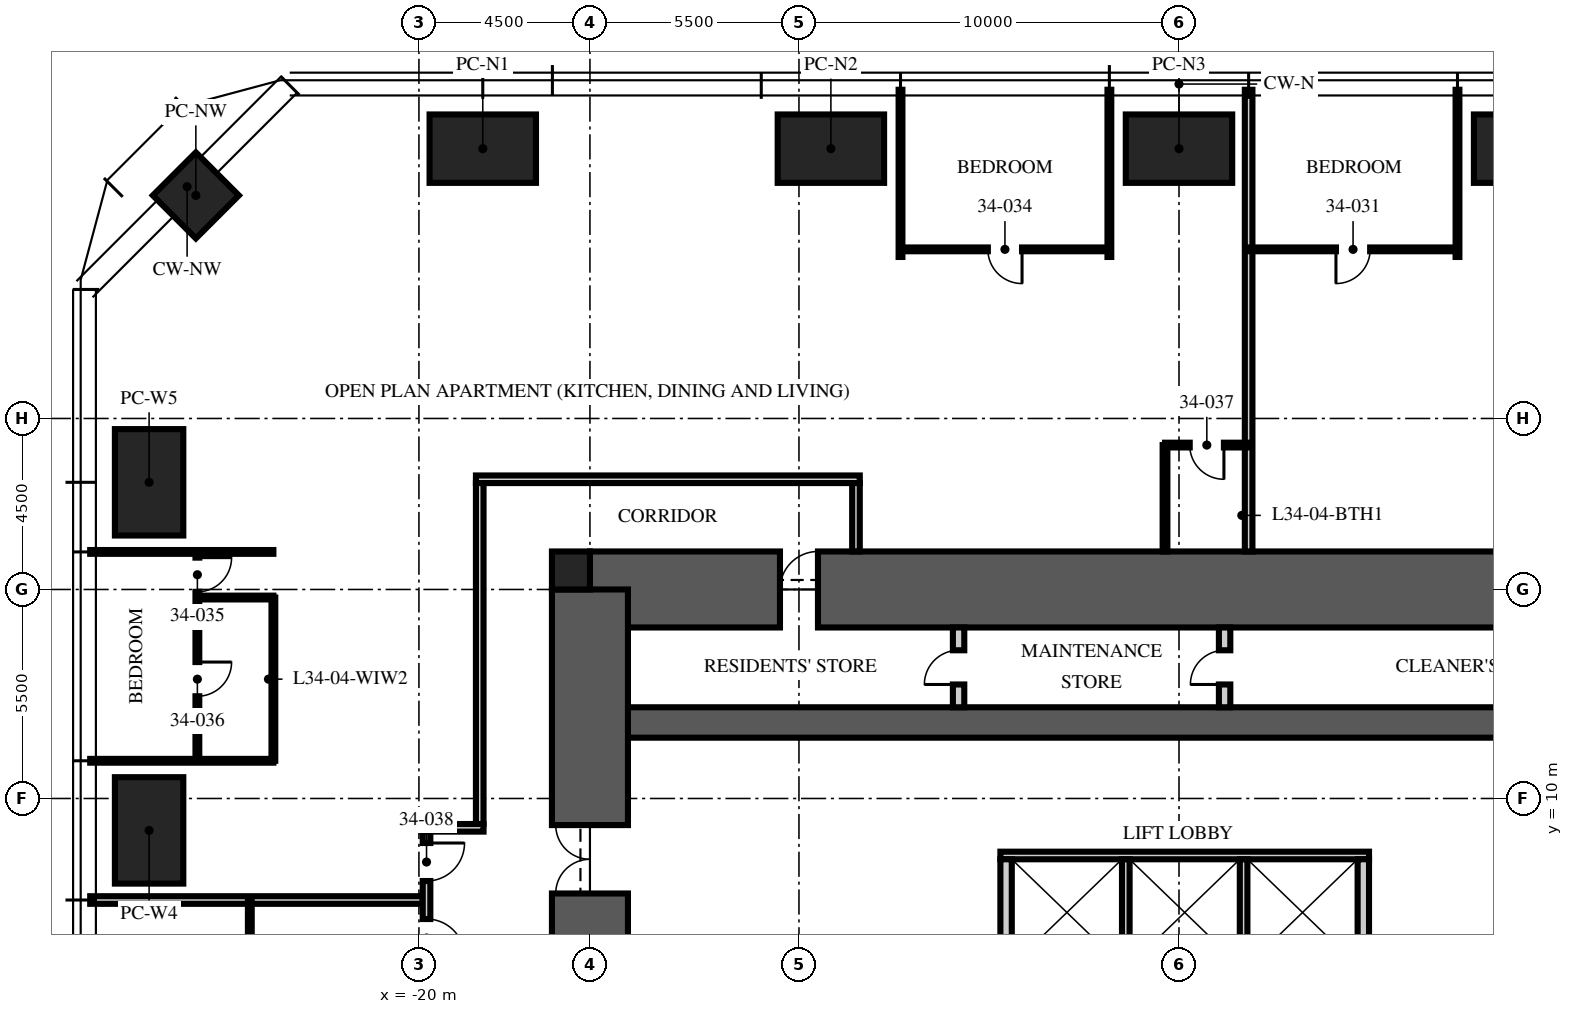
"""IFC4 building model, lengths in metres.
Left out: names, types, materials, properties, quantities, classifications, styles, units other than length and angle.
Written with IfcOpenShell. Run it as: python <this file> out.ifc"""

import sys

from ifc_helpers import new_model, si_unit, direction, frame, frame_2d, origin, origin_2d, place, context, subcontext, project, spatial, rectangle, extrude, element, fill, save


model = new_model("IFC4")
c1 = context("Model", 3, precision=1e-05, world=origin(), true_north=direction((0.0, 1.0)))
c2 = subcontext(c1, "Body", "Model", "MODEL_VIEW")
j1 = project(units=[si_unit("LENGTHUNIT", "METRE"), si_unit("PLANEANGLEUNIT", "RADIAN")], contexts=[c1])
p1 = place(None, origin())
s1 = spatial("IfcSite", under=j1, at=p1, CompositionType="ELEMENT")
p2 = place(p1, origin())
s2 = spatial("IfcBuilding", under=s1, at=p2, CompositionType="ELEMENT")
p3 = place(p2, frame((0.0, 0.0, 137.25)))
s3 = spatial("IfcBuildingStorey", under=s2, at=p3, CompositionType="ELEMENT", Elevation=137.25)
p4 = place(p3, frame((-15.5, 15.5, -0.25), z_axis=(0.0, 0.0, 1.0), x_axis=(1.0, 0.0, 0.0)))
e1 = element("IfcWall", 1, at=p4, inside=s3, PredefinedType="SHEAR", context=c2, shape_type="SweptSolid", body=[
    extrude(rectangle(XDim=31.0, YDim=2.0, at=frame_2d((15.5, 0.0))), origin(), (0.0, 0.0, 1.0), 3.75),
])
p5 = place(p4, frame((5.0, 0.0, 0.25)))
e2 = element("IfcOpeningElement", 2, at=p5, cuts=e1, PredefinedType="OPENING", context=c2, shape_type="SweptSolid", body=[
    extrude(rectangle(XDim=1.0, YDim=2.1, at=frame_2d((0.5, 1.05))), frame((0.0, 1.01, 0.0), z_axis=(0.0, -1.0, 0.0), x_axis=(1.0, 0.0, 0.0)), (0.0, 0.0, 1.0), 2.02),
])
p6 = place(p3, frame((-15.5, 12.0, -0.25), z_axis=(0.0, 0.0, 1.0), x_axis=(1.0, 0.0, 0.0)))
e3 = element("IfcWall", 3, at=p6, inside=s3, PredefinedType="SHEAR", context=c2, shape_type="SweptSolid", body=[
    extrude(rectangle(XDim=31.0, YDim=0.8, at=frame_2d((15.5, 0.0))), origin(), (0.0, 0.0, 1.0), 3.75),
])
p7 = place(p3, frame((-15.5, -15.5, -0.25), z_axis=(0.0, 0.0, 1.0), x_axis=(0.0, 1.0, 0.0)))
e4 = element("IfcWall", 4, at=p7, inside=s3, PredefinedType="SHEAR", context=c2, shape_type="SweptSolid", body=[
    extrude(rectangle(XDim=31.0, YDim=2.0, at=frame_2d((15.5, 0.0))), origin(), (0.0, 0.0, 1.0), 3.75),
])
p8 = place(p7, frame((6.5, 0.0, 0.25)))
e5 = element("IfcOpeningElement", 5, at=p8, cuts=e4, PredefinedType="OPENING", context=c2, shape_type="SweptSolid", body=[
    extrude(rectangle(XDim=1.2, YDim=2.1, at=frame_2d((0.6, 1.05))), frame((0.0, 1.01, 0.0), z_axis=(0.0, -1.0, 0.0), x_axis=(1.0, 0.0, 0.0)), (0.0, 0.0, 1.0), 2.02),
])
p9 = place(p7, frame((23.0, 0.0, 0.25)))
e6 = element("IfcOpeningElement", 6, at=p9, cuts=e4, PredefinedType="OPENING", context=c2, shape_type="SweptSolid", body=[
    extrude(rectangle(XDim=1.8, YDim=2.1, at=frame_2d((0.9, 1.05))), frame((0.0, 1.01, 0.0), z_axis=(0.0, -1.0, 0.0), x_axis=(1.0, 0.0, 0.0)), (0.0, 0.0, 1.0), 2.02),
])
p10 = place(p3, frame((-16.0, 16.0, -0.25), z_axis=(0.0, 0.0, 1.0), x_axis=(1.0, 0.0, 0.0)))
e7 = element("IfcColumn", 7, at=p10, inside=s3, PredefinedType="COLUMN", context=c2, shape_type="SweptSolid", body=[
    extrude(rectangle(XDim=1.0, YDim=1.0, at=origin_2d()), origin(), (0.0, 0.0, 1.0), 3.75),
])
for number, where, z_axis, x_axis in (
    (8, (-18.32, 27.1, 0.0), (0.0, 0.0, 1.0), (1.0, 0.0, 0.0)),
    (9, (-9.16, 27.1, 0.0), (0.0, 0.0, 1.0), (1.0, 0.0, 0.0)),
    (10, (0.0, 27.1, 0.0), (0.0, 0.0, 1.0), (1.0, 0.0, 0.0)),
    (11, (9.16, 27.1, 0.0), (0.0, 0.0, 1.0), (1.0, 0.0, 0.0)),
    (12, (-27.1, 9.16, 0.0), (0.0, 0.0, 1.0), (0.0, 1.0, 0.0)),
    (13, (-27.1, 18.32, 0.0), (0.0, 0.0, 1.0), (0.0, 1.0, 0.0)),
):
    element("IfcColumn", number, at=place(p3, frame(where, z_axis=z_axis, x_axis=x_axis)), inside=s3, PredefinedType="COLUMN", context=c2, shape_type="SweptSolid", body=[
        extrude(rectangle(XDim=2.8, YDim=1.8, at=origin_2d()), origin(), (0.0, 0.0, 1.0), 3.75),
    ])
p11 = place(p3, frame((-25.87, 25.87, 0.0), z_axis=(0.0, 0.0, 1.0), x_axis=(0.707106781187, 0.707106781187, 0.0)))
e14 = element("IfcColumn", 14, at=p11, inside=s3, PredefinedType="COLUMN", context=c2, shape_type="SweptSolid", body=[
    extrude(rectangle(XDim=1.6, YDim=1.6, at=origin_2d()), origin(), (0.0, 0.0, 1.0), 3.75),
])
p12 = place(p3, frame((-4.7, 8.5, 0.0), z_axis=(0.0, 0.0, 1.0), x_axis=(1.0, 0.0, 0.0)))
e15 = element("IfcWall", 15, at=p12, inside=s3, PredefinedType="PARTITIONING", context=c2, shape_type="SweptSolid", body=[
    extrude(rectangle(XDim=9.7, YDim=0.2, at=frame_2d((4.85, 0.0))), origin(), (0.0, 0.0, 1.0), 3.5),
])
for number, where, z_axis, x_axis in (
    (16, (-4.55, 5.6, 0.0), (0.0, 0.0, 1.0), (0.0, 1.0, 0.0)),
    (17, (4.85, 5.6, 0.0), (0.0, 0.0, 1.0), (0.0, 1.0, 0.0)),
):
    element("IfcWall", number, at=place(p3, frame(where, z_axis=z_axis, x_axis=x_axis)), inside=s3, PredefinedType="PARTITIONING", context=c2, shape_type="SweptSolid", body=[
        extrude(rectangle(XDim=2.8, YDim=0.3, at=frame_2d((1.4, 0.0))), origin(), (0.0, 0.0, 1.0), 3.5),
    ])
for number, where, z_axis, x_axis in (
    (18, (-1.4, 5.6, 0.0), (0.0, 0.0, 1.0), (0.0, 1.0, 0.0)),
    (19, (1.7, 5.6, 0.0), (0.0, 0.0, 1.0), (0.0, 1.0, 0.0)),
):
    element("IfcWall", number, at=place(p3, frame(where, z_axis=z_axis, x_axis=x_axis)), inside=s3, PredefinedType="PARTITIONING", context=c2, shape_type="SweptSolid", body=[
        extrude(rectangle(XDim=2.8, YDim=0.2, at=frame_2d((1.4, 0.0))), origin(), (0.0, 0.0, 1.0), 3.5),
    ])
p13 = place(p3, frame((-5.8, 12.4, 0.0), z_axis=(0.0, 0.0, 1.0), x_axis=(0.0, 1.0, 0.0)))
e20 = element("IfcWall", 20, at=p13, inside=s3, PredefinedType="PARTITIONING", context=c2, shape_type="SweptSolid", body=[
    extrude(rectangle(XDim=2.1, YDim=0.3, at=frame_2d((1.05, 0.0))), origin(), (0.0, 0.0, 1.0), 3.5),
])
p14 = place(p13, frame((0.6, 0.0, 0.0)))
e21 = element("IfcOpeningElement", 21, at=p14, cuts=e20, PredefinedType="OPENING", context=c2, shape_type="SweptSolid", body=[
    extrude(rectangle(XDim=0.9, YDim=2.1, at=frame_2d((0.45, 1.05))), frame((0.0, 0.16, 0.0), z_axis=(0.0, -1.0, 0.0), x_axis=(1.0, 0.0, 0.0)), (0.0, 0.0, 1.0), 0.32),
])
p15 = place(p3, frame((1.2, 12.4, 0.0), z_axis=(0.0, 0.0, 1.0), x_axis=(0.0, 1.0, 0.0)))
e22 = element("IfcWall", 22, at=p15, inside=s3, PredefinedType="PARTITIONING", context=c2, shape_type="SweptSolid", body=[
    extrude(rectangle(XDim=2.1, YDim=0.3, at=frame_2d((1.05, 0.0))), origin(), (0.0, 0.0, 1.0), 3.5),
])
p16 = place(p15, frame((0.6, 0.0, 0.0)))
e23 = element("IfcOpeningElement", 23, at=p16, cuts=e22, PredefinedType="OPENING", context=c2, shape_type="SweptSolid", body=[
    extrude(rectangle(XDim=0.9, YDim=2.1, at=frame_2d((0.45, 1.05))), frame((0.0, 0.16, 0.0), z_axis=(0.0, -1.0, 0.0), x_axis=(1.0, 0.0, 0.0)), (0.0, 0.0, 1.0), 0.32),
])
p17 = place(p3, frame((-18.5, 18.4, 0.0), z_axis=(0.0, 0.0, 1.0), x_axis=(1.0, 0.0, 0.0)))
e24 = element("IfcWall", 24, at=p17, inside=s3, PredefinedType="PARTITIONING", context=c2, shape_type="SweptSolid", body=[
    extrude(rectangle(XDim=10.1, YDim=0.2, at=frame_2d((5.05, 0.0))), origin(), (0.0, 0.0, 1.0), 2.3),
])
p18 = place(p3, frame((-8.5, 18.3, 0.0), z_axis=(0.0, 0.0, 1.0), x_axis=(0.0, -1.0, 0.0)))
e25 = element("IfcWall", 25, at=p18, inside=s3, PredefinedType="PARTITIONING", context=c2, shape_type="SweptSolid", body=[
    extrude(rectangle(XDim=1.8, YDim=0.2, at=frame_2d((0.9, 0.0))), origin(), (0.0, 0.0, 1.0), 3.5),
])
p19 = place(p3, frame((7.328, 24.25, 0.0), z_axis=(0.0, 0.0, 1.0), x_axis=(0.0, 1.0, 0.0)))
e26 = element("IfcWall", 26, at=p19, inside=s3, PredefinedType="PARTITIONING", context=c2, shape_type="SweptSolid", body=[
    extrude(rectangle(XDim=4.4, YDim=0.1, at=frame_2d((2.2, 0.0))), origin(), (0.0, 0.0, 1.0), 2.81),
])
p20 = place(p3, frame((1.832, 16.5, 0.0), z_axis=(0.0, 0.0, 1.0), x_axis=(0.0, 1.0, 0.0)))
e27 = element("IfcWall", 27, at=p20, inside=s3, PredefinedType="PARTITIONING", context=c2, shape_type="SweptSolid", body=[
    extrude(rectangle(XDim=12.15, YDim=0.2, at=frame_2d((6.075, 0.0))), origin(), (0.0, 0.0, 1.0), 2.81),
])
for number, where, z_axis, x_axis in (
    (28, (-1.832, 24.25, 0.0), (0.0, 0.0, 1.0), (0.0, 1.0, 0.0)),
    (29, (-7.328, 24.25, 0.0), (0.0, 0.0, 1.0), (0.0, 1.0, 0.0)),
):
    element("IfcWall", number, at=place(p3, frame(where, z_axis=z_axis, x_axis=x_axis)), inside=s3, PredefinedType="PARTITIONING", context=c2, shape_type="SweptSolid", body=[
        extrude(rectangle(XDim=4.4, YDim=0.1, at=frame_2d((2.2, 0.0))), origin(), (0.0, 0.0, 1.0), 2.81),
    ])
for number, where, z_axis, x_axis in (
    (30, (-23.83, 16.488, 0.0), (0.0, 0.0, 1.0), (-1.0, 0.0, 0.0)),
    (31, (-23.83, 10.992, 0.0), (0.0, 0.0, 1.0), (-1.0, 0.0, 0.0)),
):
    element("IfcWall", number, at=place(p3, frame(where, z_axis=z_axis, x_axis=x_axis)), inside=s3, PredefinedType="PARTITIONING", context=c2, shape_type="SweptSolid", body=[
        extrude(rectangle(XDim=4.82, YDim=0.1, at=frame_2d((2.41, 0.0))), origin(), (0.0, 0.0, 1.0), 2.81),
    ])
p21 = place(p3, frame((-19.9, 7.328, 0.0), z_axis=(0.0, 0.0, 1.0), x_axis=(-1.0, 0.0, 0.0)))
e32 = element("IfcWall", 32, at=p21, inside=s3, PredefinedType="PARTITIONING", context=c2, shape_type="SweptSolid", body=[
    extrude(rectangle(XDim=8.75, YDim=0.2, at=frame_2d((4.375, 0.0))), origin(), (0.0, 0.0, 1.0), 2.81),
])
p22 = place(p3, frame((7.328, 24.45, 0.0), z_axis=(0.0, 0.0, 1.0), x_axis=(-1.0, 0.0, 0.0)))
e33 = element("IfcWall", 33, at=p22, inside=s3, PredefinedType="PARTITIONING", context=c2, shape_type="SweptSolid", body=[
    extrude(rectangle(XDim=5.496, YDim=0.1, at=frame_2d((2.748, 0.0))), origin(), (0.0, 0.0, 1.0), 2.81),
])
p23 = place(p22, frame((2.298, 0.0, 0.0)))
e34 = element("IfcOpeningElement", 34, at=p23, cuts=e33, PredefinedType="OPENING", context=c2, shape_type="SweptSolid", body=[
    extrude(rectangle(XDim=0.9, YDim=2.1, at=frame_2d((0.45, 1.05))), frame((0.0, 0.06, 0.0), z_axis=(0.0, -1.0, 0.0), x_axis=(1.0, 0.0, 0.0)), (0.0, 0.0, 1.0), 0.12),
])
p24 = place(p3, frame((-1.832, 24.45, 0.0), z_axis=(0.0, 0.0, 1.0), x_axis=(-1.0, 0.0, 0.0)))
e35 = element("IfcWall", 35, at=p24, inside=s3, PredefinedType="PARTITIONING", context=c2, shape_type="SweptSolid", body=[
    extrude(rectangle(XDim=5.496, YDim=0.1, at=frame_2d((2.748, 0.0))), origin(), (0.0, 0.0, 1.0), 2.81),
])
p25 = place(p24, frame((2.298, 0.0, 0.0)))
e36 = element("IfcOpeningElement", 36, at=p25, cuts=e35, PredefinedType="OPENING", context=c2, shape_type="SweptSolid", body=[
    extrude(rectangle(XDim=0.9, YDim=2.1, at=frame_2d((0.45, 1.05))), frame((0.0, 0.06, 0.0), z_axis=(0.0, -1.0, 0.0), x_axis=(1.0, 0.0, 0.0)), (0.0, 0.0, 1.0), 0.12),
])
p26 = place(p3, frame((-25.83, 16.488, 0.0), z_axis=(0.0, 0.0, 1.0), x_axis=(0.0, -1.0, 0.0)))
e37 = element("IfcWall", 37, at=p26, inside=s3, PredefinedType="PARTITIONING", context=c2, shape_type="SweptSolid", body=[
    extrude(rectangle(XDim=5.496, YDim=0.1, at=frame_2d((2.748, 0.0))), origin(), (0.0, 0.0, 1.0), 2.81),
])
p27 = place(p26, frame((0.15, 0.0, 0.0)))
e38 = element("IfcOpeningElement", 38, at=p27, cuts=e37, PredefinedType="OPENING", context=c2, shape_type="SweptSolid", body=[
    extrude(rectangle(XDim=0.9, YDim=2.1, at=frame_2d((0.45, 1.05))), frame((0.0, 0.06, 0.0), z_axis=(0.0, -1.0, 0.0), x_axis=(1.0, 0.0, 0.0)), (0.0, 0.0, 1.0), 0.12),
])
p28 = place(p26, frame((2.898, 0.0, 0.0)))
e39 = element("IfcOpeningElement", 39, at=p28, cuts=e37, PredefinedType="OPENING", context=c2, shape_type="SweptSolid", body=[
    extrude(rectangle(XDim=0.9, YDim=2.1, at=frame_2d((0.45, 1.05))), frame((0.0, 0.06, 0.0), z_axis=(0.0, -1.0, 0.0), x_axis=(1.0, 0.0, 0.0)), (0.0, 0.0, 1.0), 0.12),
])
p29 = place(p3, frame((-23.83, 15.288, 0.0), z_axis=(0.0, 0.0, 1.0), x_axis=(-1.0, 0.0, 0.0)))
e40 = element("IfcWall", 40, at=p29, inside=s3, PredefinedType="PARTITIONING", context=c2, shape_type="SweptSolid", body=[
    extrude(rectangle(XDim=2.0, YDim=0.1, at=frame_2d((1.0, 0.0))), origin(), (0.0, 0.0, 1.0), 3.5),
])
p30 = place(p3, frame((-23.83, 15.288, 0.0), z_axis=(0.0, 0.0, 1.0), x_axis=(0.0, -1.0, 0.0)))
e41 = element("IfcWall", 41, at=p30, inside=s3, PredefinedType="PARTITIONING", context=c2, shape_type="SweptSolid", body=[
    extrude(rectangle(XDim=4.296, YDim=0.1, at=frame_2d((2.148, 0.0))), origin(), (0.0, 0.0, 1.0), 2.81),
])
p31 = place(p3, frame((1.832, 19.3, 0.0), z_axis=(0.0, 0.0, 1.0), x_axis=(-1.0, 0.0, 0.0)))
e42 = element("IfcWall", 42, at=p31, inside=s3, PredefinedType="PARTITIONING", context=c2, shape_type="SweptSolid", body=[
    extrude(rectangle(XDim=2.2, YDim=0.125, at=frame_2d((1.1, 0.0))), origin(), (0.0, 0.0, 1.0), 2.7),
])
p32 = place(p31, frame((0.65, 0.0, 0.0)))
e43 = element("IfcOpeningElement", 43, at=p32, cuts=e42, PredefinedType="OPENING", context=c2, shape_type="SweptSolid", body=[
    extrude(rectangle(XDim=0.9, YDim=2.1, at=frame_2d((0.45, 1.05))), frame((0.0, 0.073, 0.0), z_axis=(0.0, -1.0, 0.0), x_axis=(1.0, 0.0, 0.0)), (0.0, 0.0, 1.0), 0.145),
])
p33 = place(p3, frame((-0.368, 16.5, 0.0), z_axis=(0.0, 0.0, 1.0), x_axis=(0.0, 1.0, 0.0)))
e44 = element("IfcWall", 44, at=p33, inside=s3, PredefinedType="PARTITIONING", context=c2, shape_type="SweptSolid", body=[
    extrude(rectangle(XDim=2.8, YDim=0.125, at=frame_2d((1.4, 0.0))), origin(), (0.0, 0.0, 1.0), 3.5),
])
p34 = place(p3, frame((-24.45, 7.328, 0.0), z_axis=(0.0, 0.0, 1.0), x_axis=(0.0, -1.0, 0.0)))
e45 = element("IfcWall", 45, at=p34, inside=s3, PredefinedType="PARTITIONING", context=c2, shape_type="SweptSolid", body=[
    extrude(rectangle(XDim=5.496, YDim=0.1, at=frame_2d((2.748, 0.0))), origin(), (0.0, 0.0, 1.0), 2.81),
])
p35 = place(p34, frame((2.298, 0.0, 0.0)))
e46 = element("IfcOpeningElement", 46, at=p35, cuts=e45, PredefinedType="OPENING", context=c2, shape_type="SweptSolid", body=[
    extrude(rectangle(XDim=0.9, YDim=2.1, at=frame_2d((0.45, 1.05))), frame((0.0, 0.06, 0.0), z_axis=(0.0, -1.0, 0.0), x_axis=(1.0, 0.0, 0.0)), (0.0, 0.0, 1.0), 0.12),
])
p36 = place(p3, frame((-18.4, 18.3, 0.0), z_axis=(0.0, 0.0, 1.0), x_axis=(0.0, -1.0, 0.0)))
e47 = element("IfcWall", 47, at=p36, inside=s3, PredefinedType="PARTITIONING", context=c2, shape_type="SweptSolid", body=[
    extrude(rectangle(XDim=8.972, YDim=0.2, at=frame_2d((4.486, 0.0))), origin(), (0.0, 0.0, 1.0), 2.3),
])
p37 = place(p3, frame((-18.3, 9.228, 0.0), z_axis=(0.0, 0.0, 1.0), x_axis=(-1.0, 0.0, 0.0)))
e48 = element("IfcWall", 48, at=p37, inside=s3, PredefinedType="PARTITIONING", context=c2, shape_type="SweptSolid", body=[
    extrude(rectangle(XDim=1.6, YDim=0.2, at=frame_2d((0.8, 0.0))), origin(), (0.0, 0.0, 1.0), 2.7),
])
p38 = place(p3, frame((-19.8, 9.128, 0.0), z_axis=(0.0, 0.0, 1.0), x_axis=(0.0, -1.0, 0.0)))
e49 = element("IfcWall", 49, at=p38, inside=s3, PredefinedType="PARTITIONING", context=c2, shape_type="SweptSolid", body=[
    extrude(rectangle(XDim=3.6, YDim=0.2, at=frame_2d((1.8, 0.0))), origin(), (0.0, 0.0, 1.0), 2.7),
])
p39 = place(p38, frame((0.3, 0.0, 0.0)))
e50 = element("IfcOpeningElement", 50, at=p39, cuts=e49, PredefinedType="OPENING", context=c2, shape_type="SweptSolid", body=[
    extrude(rectangle(XDim=1.0, YDim=2.2, at=frame_2d((0.5, 1.1))), frame((0.0, 0.11, 0.0), z_axis=(0.0, -1.0, 0.0), x_axis=(1.0, 0.0, 0.0)), (0.0, 0.0, 1.0), 0.22),
])
p40 = place(p38, frame((2.3, 0.0, 0.0)))
e51 = element("IfcOpeningElement", 51, at=p40, cuts=e49, PredefinedType="OPENING", context=c2, shape_type="SweptSolid", body=[
    extrude(rectangle(XDim=1.0, YDim=2.2, at=frame_2d((0.5, 1.1))), frame((0.0, 0.11, 0.0), z_axis=(0.0, -1.0, 0.0), x_axis=(1.0, 0.0, 0.0)), (0.0, 0.0, 1.0), 0.22),
])
p41 = place(p9, origin())
e52 = element("IfcDoor", 52, at=p41, inside=s3, OperationType="DOUBLE_DOOR_SINGLE_SWING", PredefinedType="DOOR", context=c2, shape_type="SweptSolid", body=[
    extrude(rectangle(XDim=1.8, YDim=2.1, at=frame_2d((0.9, 1.05))), frame((0.0, 0.025, 0.0), z_axis=(0.0, -1.0, 0.0), x_axis=(1.0, 0.0, 0.0)), (0.0, 0.0, 1.0), 0.05),
])
fill(e6, e52)
p42 = place(p14, origin())
e53 = element("IfcDoor", 53, at=p42, inside=s3, OperationType="SINGLE_SWING_LEFT", PredefinedType="DOOR", context=c2, shape_type="SweptSolid", body=[
    extrude(rectangle(XDim=0.9, YDim=2.1, at=frame_2d((0.45, 1.05))), frame((0.0, 0.025, 0.0), z_axis=(0.0, -1.0, 0.0), x_axis=(1.0, 0.0, 0.0)), (0.0, 0.0, 1.0), 0.05),
])
fill(e21, e53)
p43 = place(p16, origin())
e54 = element("IfcDoor", 54, at=p43, inside=s3, OperationType="SINGLE_SWING_LEFT", PredefinedType="DOOR", context=c2, shape_type="SweptSolid", body=[
    extrude(rectangle(XDim=0.9, YDim=2.1, at=frame_2d((0.45, 1.05))), frame((0.0, 0.025, 0.0), z_axis=(0.0, -1.0, 0.0), x_axis=(1.0, 0.0, 0.0)), (0.0, 0.0, 1.0), 0.05),
])
fill(e23, e54)
p44 = place(p5, origin())
e55 = element("IfcDoor", 55, at=p44, inside=s3, OperationType="SINGLE_SWING_RIGHT", PredefinedType="DOOR", context=c2, shape_type="SweptSolid", body=[
    extrude(rectangle(XDim=1.0, YDim=2.1, at=frame_2d((0.5, 1.05))), frame((0.0, 0.025, 0.0), z_axis=(0.0, -1.0, 0.0), x_axis=(1.0, 0.0, 0.0)), (0.0, 0.0, 1.0), 0.05),
])
fill(e2, e55)
p45 = place(p23, origin())
e56 = element("IfcDoor", 56, at=p45, inside=s3, OperationType="SINGLE_SWING_RIGHT", PredefinedType="DOOR", context=c2, shape_type="SweptSolid", body=[
    extrude(rectangle(XDim=0.9, YDim=2.1, at=frame_2d((0.45, 1.05))), frame((0.0, 0.025, 0.0), z_axis=(0.0, -1.0, 0.0), x_axis=(1.0, 0.0, 0.0)), (0.0, 0.0, 1.0), 0.05),
])
fill(e34, e56)
p46 = place(p25, origin())
e57 = element("IfcDoor", 57, at=p46, inside=s3, OperationType="SINGLE_SWING_LEFT", PredefinedType="DOOR", context=c2, shape_type="SweptSolid", body=[
    extrude(rectangle(XDim=0.9, YDim=2.1, at=frame_2d((0.45, 1.05))), frame((0.0, 0.025, 0.0), z_axis=(0.0, -1.0, 0.0), x_axis=(1.0, 0.0, 0.0)), (0.0, 0.0, 1.0), 0.05),
])
fill(e36, e57)
p47 = place(p27, origin())
e58 = element("IfcDoor", 58, at=p47, inside=s3, OperationType="SINGLE_SWING_LEFT", PredefinedType="DOOR", context=c2, shape_type="SweptSolid", body=[
    extrude(rectangle(XDim=0.9, YDim=2.1, at=frame_2d((0.45, 1.05))), frame((0.0, 0.025, 0.0), z_axis=(0.0, -1.0, 0.0), x_axis=(1.0, 0.0, 0.0)), (0.0, 0.0, 1.0), 0.05),
])
fill(e38, e58)
p48 = place(p28, origin())
e59 = element("IfcDoor", 59, at=p48, inside=s3, OperationType="SINGLE_SWING_LEFT", PredefinedType="DOOR", context=c2, shape_type="SweptSolid", body=[
    extrude(rectangle(XDim=0.9, YDim=2.1, at=frame_2d((0.45, 1.05))), frame((0.0, 0.025, 0.0), z_axis=(0.0, -1.0, 0.0), x_axis=(1.0, 0.0, 0.0)), (0.0, 0.0, 1.0), 0.05),
])
fill(e39, e59)
p49 = place(p32, origin())
e60 = element("IfcDoor", 60, at=p49, inside=s3, OperationType="SINGLE_SWING_LEFT", PredefinedType="DOOR", context=c2, shape_type="SweptSolid", body=[
    extrude(rectangle(XDim=0.9, YDim=2.1, at=frame_2d((0.45, 1.05))), frame((0.0, 0.025, 0.0), z_axis=(0.0, -1.0, 0.0), x_axis=(1.0, 0.0, 0.0)), (0.0, 0.0, 1.0), 0.05),
])
fill(e43, e60)
p50 = place(p39, origin())
e61 = element("IfcDoor", 61, at=p50, inside=s3, OperationType="SINGLE_SWING_LEFT", PredefinedType="DOOR", context=c2, shape_type="SweptSolid", body=[
    extrude(rectangle(XDim=1.0, YDim=2.2, at=frame_2d((0.5, 1.1))), frame((0.0, 0.025, 0.0), z_axis=(0.0, -1.0, 0.0), x_axis=(1.0, 0.0, 0.0)), (0.0, 0.0, 1.0), 0.05),
])
fill(e50, e61)
p51 = place(p40, origin())
e62 = element("IfcDoor", 62, at=p51, inside=s3, OperationType="SINGLE_SWING_RIGHT", PredefinedType="DOOR", context=c2, shape_type="SweptSolid", body=[
    extrude(rectangle(XDim=1.0, YDim=2.2, at=frame_2d((0.5, 1.1))), frame((0.0, 0.025, 0.0), z_axis=(0.0, -1.0, 0.0), x_axis=(1.0, 0.0, 0.0)), (0.0, 0.0, 1.0), 0.05),
])
fill(e51, e62)
save(model, sys.argv[1])
